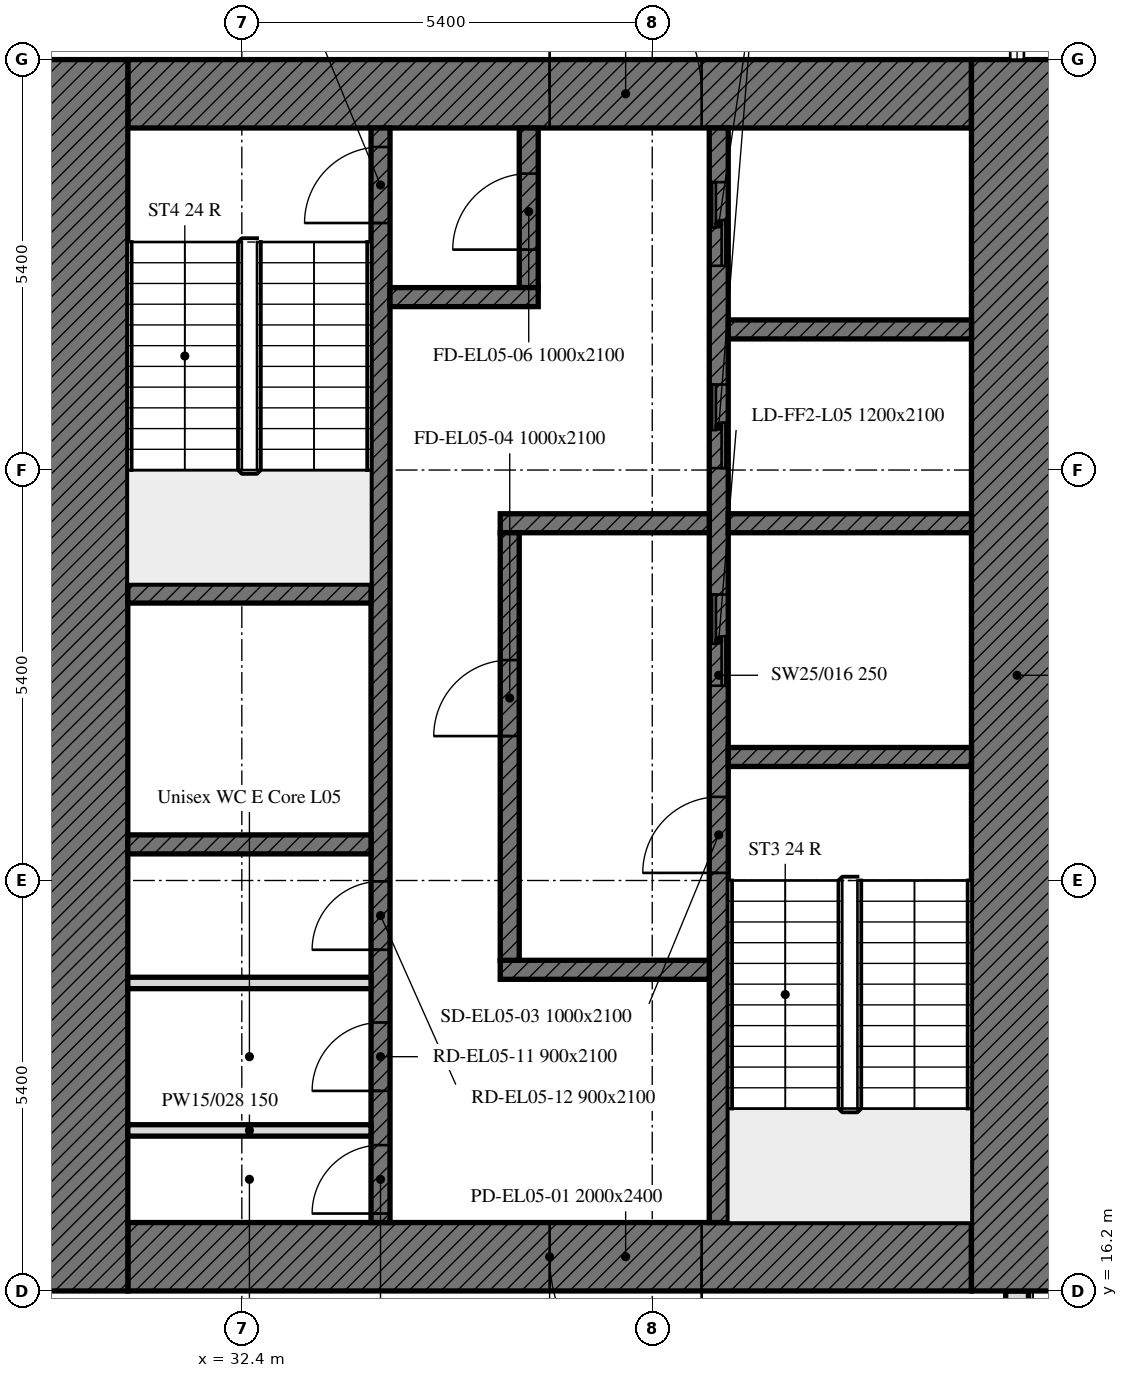
"""IFC4 building model, lengths in metres.
Left out: names, types, materials, properties, quantities, classifications, styles, units other than length and angle.
Written with IfcOpenShell. Run it as: python <this file> out.ifc"""

import sys

from ifc_helpers import new_model, si_unit, direction, frame, frame_2d, origin, place, context, subcontext, project, spatial, rectangle, extrude, element, fill, save


model = new_model("IFC4")
c1 = context("Model", 3, precision=1e-05, world=origin(), true_north=direction((0.0, 1.0)))
c2 = subcontext(c1, "Body", "Model", "MODEL_VIEW")
j1 = project(units=[si_unit("LENGTHUNIT", "METRE"), si_unit("PLANEANGLEUNIT", "RADIAN")], contexts=[c1])
p1 = place(None, origin())
s1 = spatial("IfcSite", under=j1, at=p1, CompositionType="ELEMENT")
p2 = place(p1, origin())
s2 = spatial("IfcBuilding", under=s1, at=p2, CompositionType="ELEMENT")
p3 = place(p2, frame((0.0, 0.0, 29.1)))
s3 = spatial("IfcBuildingStorey", under=s2, at=p3, CompositionType="ELEMENT", Elevation=29.1)
p4 = place(p3, frame((42.6, 5.586, 0.0), z_axis=(0.0, 0.0, 1.0), x_axis=(0.0, 1.0, 0.0)))
e1 = element("IfcWall", 1, at=p4, inside=s3, PredefinedType="SOLIDWALL", context=c2, shape_type="SweptSolid", body=[
    extrude(rectangle(XDim=10.614, YDim=0.3, at=frame_2d((5.307, 0.0))), origin(), (0.0, 0.0, 1.0), 4.2),
])
p5 = place(p4, frame((0.714, 0.0, 0.0)))
e2 = element("IfcOpeningElement", 2, at=p5, cuts=e1, PredefinedType="OPENING", context=c2, shape_type="SweptSolid", body=[
    extrude(rectangle(XDim=1.8, YDim=2.4, at=frame_2d((0.9, 1.2))), frame((0.0, 0.16, 0.0), z_axis=(0.0, -1.0, 0.0), x_axis=(1.0, 0.0, 0.0)), (0.0, 0.0, 1.0), 0.32),
])
p6 = place(p4, frame((6.114, 0.0, 0.0)))
e3 = element("IfcOpeningElement", 3, at=p6, cuts=e1, PredefinedType="OPENING", context=c2, shape_type="SweptSolid", body=[
    extrude(rectangle(XDim=1.8, YDim=2.4, at=frame_2d((0.9, 1.2))), frame((0.0, 0.16, 0.0), z_axis=(0.0, -1.0, 0.0), x_axis=(1.0, 0.0, 0.0)), (0.0, 0.0, 1.0), 0.32),
])
p7 = place(p3, frame((42.0, 16.65, 0.0), z_axis=(0.0, 0.0, 1.0), x_axis=(-1.0, 0.0, 0.0)))
e4 = element("IfcWall", 4, at=p7, inside=s3, PredefinedType="SOLIDWALL", context=c2, shape_type="SweptSolid", body=[
    extrude(rectangle(XDim=11.1, YDim=0.9, at=frame_2d((5.55, 0.0))), origin(), (0.0, 0.0, 1.0), 4.2),
])
p8 = place(p7, frame((3.55, 0.0, 0.0)))
e5 = element("IfcOpeningElement", 5, at=p8, cuts=e4, PredefinedType="OPENING", context=c2, shape_type="SweptSolid", body=[
    extrude(rectangle(XDim=2.0, YDim=2.4, at=frame_2d((1.0, 1.2))), frame((0.0, 0.45, 0.0), z_axis=(0.0, -1.0, 0.0), x_axis=(1.0, 0.0, 0.0)), (0.0, 0.0, 1.0), 0.9),
])
p9 = place(p3, frame((30.9, 31.95, 0.0), z_axis=(0.0, 0.0, 1.0), x_axis=(1.0, 0.0, 0.0)))
e6 = element("IfcWall", 6, at=p9, inside=s3, PredefinedType="SOLIDWALL", context=c2, shape_type="SweptSolid", body=[
    extrude(rectangle(XDim=11.1, YDim=0.9, at=frame_2d((5.55, 0.0))), origin(), (0.0, 0.0, 1.0), 4.2),
])
p10 = place(p9, frame((5.55, 0.0, 0.0)))
e7 = element("IfcOpeningElement", 7, at=p10, cuts=e6, PredefinedType="OPENING", context=c2, shape_type="SweptSolid", body=[
    extrude(rectangle(XDim=2.0, YDim=2.4, at=frame_2d((1.0, 1.2))), frame((0.0, 0.45, 0.0), z_axis=(0.0, -1.0, 0.0), x_axis=(1.0, 0.0, 0.0)), (0.0, 0.0, 1.0), 0.9),
])
for number, where, z_axis, x_axis in (
    (8, (42.6, 32.4, 0.0), (0.0, 0.0, 1.0), (0.0, -1.0, 0.0)),
    (9, (30.3, 16.2, 0.0), (0.0, 0.0, 1.0), (0.0, 1.0, 0.0)),
):
    element("IfcWall", number, at=place(p3, frame(where, z_axis=z_axis, x_axis=x_axis)), inside=s3, PredefinedType="SOLIDWALL", context=c2, shape_type="SweptSolid", body=[
        extrude(rectangle(XDim=16.2, YDim=1.2, at=frame_2d((8.1, 0.0))), origin(), (0.0, 0.0, 1.0), 4.2),
    ])
p11 = place(p3, frame((38.675, 17.1, 0.0), z_axis=(0.0, 0.0, 1.0), x_axis=(0.0, 1.0, 0.0)))
e10 = element("IfcWall", 10, at=p11, inside=s3, PredefinedType="SOLIDWALL", context=c2, shape_type="SweptSolid", body=[
    extrude(rectangle(XDim=14.4, YDim=0.25, at=frame_2d((7.2, 0.0))), origin(), (0.0, 0.0, 1.0), 4.2),
])
p12 = place(p11, frame((4.6, 0.0, 0.0)))
e11 = element("IfcOpeningElement", 11, at=p12, cuts=e10, PredefinedType="OPENING", context=c2, shape_type="SweptSolid", body=[
    extrude(rectangle(XDim=1.0, YDim=2.1, at=frame_2d((0.5, 1.05))), frame((0.0, 0.125, 0.0), z_axis=(0.0, -1.0, 0.0), x_axis=(1.0, 0.0, 0.0)), (0.0, 0.0, 1.0), 0.25),
])
p13 = place(p11, frame((7.062, 0.0, 0.0)))
e12 = element("IfcOpeningElement", 12, at=p13, cuts=e10, PredefinedType="OPENING", context=c2, shape_type="SweptSolid", body=[
    extrude(rectangle(XDim=1.2, YDim=2.1, at=frame_2d((0.6, 1.05))), frame((0.0, 0.125, 0.0), z_axis=(0.0, -1.0, 0.0), x_axis=(1.0, 0.0, 0.0)), (0.0, 0.0, 1.0), 0.25),
])
p14 = place(p11, frame((9.925, 0.0, 0.0)))
e13 = element("IfcOpeningElement", 13, at=p14, cuts=e10, PredefinedType="OPENING", context=c2, shape_type="SweptSolid", body=[
    extrude(rectangle(XDim=1.1, YDim=2.1, at=frame_2d((0.55, 1.05))), frame((0.0, 0.125, 0.0), z_axis=(0.0, -1.0, 0.0), x_axis=(1.0, 0.0, 0.0)), (0.0, 0.0, 1.0), 0.25),
])
p15 = place(p11, frame((12.587, 0.0, 0.0)))
e14 = element("IfcOpeningElement", 14, at=p15, cuts=e10, PredefinedType="OPENING", context=c2, shape_type="SweptSolid", body=[
    extrude(rectangle(XDim=1.1, YDim=2.1, at=frame_2d((0.55, 1.05))), frame((0.0, 0.125, 0.0), z_axis=(0.0, -1.0, 0.0), x_axis=(1.0, 0.0, 0.0)), (0.0, 0.0, 1.0), 0.25),
])
p16 = place(p3, frame((34.225, 17.1, 0.0), z_axis=(0.0, 0.0, 1.0), x_axis=(0.0, 1.0, 0.0)))
e15 = element("IfcWall", 15, at=p16, inside=s3, PredefinedType="SOLIDWALL", context=c2, shape_type="SweptSolid", body=[
    extrude(rectangle(XDim=14.4, YDim=0.25, at=frame_2d((7.2, 0.0))), origin(), (0.0, 0.0, 1.0), 4.2),
])
p17 = place(p16, frame((13.15, 0.0, 0.0)))
e16 = element("IfcOpeningElement", 16, at=p17, cuts=e15, PredefinedType="OPENING", context=c2, shape_type="SweptSolid", body=[
    extrude(rectangle(XDim=1.0, YDim=2.1, at=frame_2d((0.5, 1.05))), frame((0.0, 0.125, 0.0), z_axis=(0.0, -1.0, 0.0), x_axis=(1.0, 0.0, 0.0)), (0.0, 0.0, 1.0), 0.25),
])
p18 = place(p16, frame((0.118, 0.0, 0.0)))
e17 = element("IfcOpeningElement", 17, at=p18, cuts=e15, PredefinedType="OPENING", context=c2, shape_type="SweptSolid", body=[
    extrude(rectangle(XDim=0.9, YDim=2.1, at=frame_2d((0.45, 1.05))), frame((0.0, 0.125, 0.0), z_axis=(0.0, -1.0, 0.0), x_axis=(1.0, 0.0, 0.0)), (0.0, 0.0, 1.0), 0.25),
])
p19 = place(p16, frame((1.732, 0.0, 0.0)))
e18 = element("IfcOpeningElement", 18, at=p19, cuts=e15, PredefinedType="OPENING", context=c2, shape_type="SweptSolid", body=[
    extrude(rectangle(XDim=0.9, YDim=2.1, at=frame_2d((0.45, 1.05))), frame((0.0, 0.125, 0.0), z_axis=(0.0, -1.0, 0.0), x_axis=(1.0, 0.0, 0.0)), (0.0, 0.0, 1.0), 0.25),
])
p20 = place(p16, frame((3.588, 0.0, 0.0)))
e19 = element("IfcOpeningElement", 19, at=p20, cuts=e15, PredefinedType="OPENING", context=c2, shape_type="SweptSolid", body=[
    extrude(rectangle(XDim=0.9, YDim=2.1, at=frame_2d((0.45, 1.05))), frame((0.0, 0.125, 0.0), z_axis=(0.0, -1.0, 0.0), x_axis=(1.0, 0.0, 0.0)), (0.0, 0.0, 1.0), 0.25),
])
p21 = place(p3, frame((38.8, 23.225, 0.0), z_axis=(0.0, 0.0, 1.0), x_axis=(1.0, 0.0, 0.0)))
e20 = element("IfcWall", 20, at=p21, inside=s3, PredefinedType="SOLIDWALL", context=c2, shape_type="SweptSolid", body=[
    extrude(rectangle(XDim=3.2, YDim=0.25, at=frame_2d((1.6, 0.0))), origin(), (0.0, 0.0, 1.0), 4.2),
])
for number, where, z_axis, x_axis in (
    (21, (30.9, 25.375, 0.0), (0.0, 0.0, 1.0), (1.0, 0.0, 0.0)),
    (22, (30.9, 22.075, 0.0), (0.0, 0.0, 1.0), (1.0, 0.0, 0.0)),
):
    element("IfcWall", number, at=place(p3, frame(where, z_axis=z_axis, x_axis=x_axis)), inside=s3, PredefinedType="SOLIDWALL", context=c2, shape_type="SweptSolid", body=[
        extrude(rectangle(XDim=3.2, YDim=0.25, at=frame_2d((1.6, 0.0))), origin(), (0.0, 0.0, 1.0), 4.2),
    ])
p22 = place(p3, frame((38.8, 26.3, 0.0), z_axis=(0.0, 0.0, 1.0), x_axis=(1.0, 0.0, 0.0)))
e23 = element("IfcWall", 23, at=p22, inside=s3, PredefinedType="SOLIDWALL", context=c2, shape_type="SweptSolid", body=[
    extrude(rectangle(XDim=3.2, YDim=0.25, at=frame_2d((1.6, 0.0))), origin(), (0.0, 0.0, 1.0), 4.2),
])
for number, where, z_axis, x_axis in (
    (24, (35.8, 26.3, 0.0), (0.0, 0.0, 1.0), (1.0, 0.0, 0.0)),
    (25, (35.8, 20.425, 0.0), (0.0, 0.0, 1.0), (1.0, 0.0, 0.0)),
):
    element("IfcWall", number, at=place(p3, frame(where, z_axis=z_axis, x_axis=x_axis)), inside=s3, PredefinedType="SOLIDWALL", context=c2, shape_type="SweptSolid", body=[
        extrude(rectangle(XDim=2.75, YDim=0.25, at=frame_2d((1.375, 0.0))), origin(), (0.0, 0.0, 1.0), 4.2),
    ])
p23 = place(p3, frame((36.175, 29.4, 0.0), z_axis=(0.0, 0.0, 1.0), x_axis=(0.0, 1.0, 0.0)))
e26 = element("IfcWall", 26, at=p23, inside=s3, PredefinedType="SOLIDWALL", context=c2, shape_type="SweptSolid", body=[
    extrude(rectangle(XDim=2.1, YDim=0.25, at=frame_2d((1.05, 0.0))), origin(), (0.0, 0.0, 1.0), 4.2),
])
p24 = place(p23, frame((0.5, 0.0, 0.0)))
e27 = element("IfcOpeningElement", 27, at=p24, cuts=e26, PredefinedType="OPENING", context=c2, shape_type="SweptSolid", body=[
    extrude(rectangle(XDim=1.0, YDim=2.1, at=frame_2d((0.5, 1.05))), frame((0.0, 0.125, 0.0), z_axis=(0.0, -1.0, 0.0), x_axis=(1.0, 0.0, 0.0)), (0.0, 0.0, 1.0), 0.25),
])
p25 = place(p3, frame((34.35, 29.275, 0.0), z_axis=(0.0, 0.0, 1.0), x_axis=(1.0, 0.0, 0.0)))
e28 = element("IfcWall", 28, at=p25, inside=s3, PredefinedType="SOLIDWALL", context=c2, shape_type="SweptSolid", body=[
    extrude(rectangle(XDim=1.95, YDim=0.25, at=frame_2d((0.975, 0.0))), origin(), (0.0, 0.0, 1.0), 4.2),
])
p26 = place(p3, frame((35.925, 20.55, 0.0), z_axis=(0.0, 0.0, 1.0), x_axis=(0.0, 1.0, 0.0)))
e29 = element("IfcWall", 29, at=p26, inside=s3, PredefinedType="SOLIDWALL", context=c2, shape_type="SweptSolid", body=[
    extrude(rectangle(XDim=5.625, YDim=0.25, at=frame_2d((2.812, 0.0))), origin(), (0.0, 0.0, 1.0), 4.2),
])
p27 = place(p26, frame((2.95, 0.0, 0.0)))
e30 = element("IfcOpeningElement", 30, at=p27, cuts=e29, PredefinedType="OPENING", context=c2, shape_type="SweptSolid", body=[
    extrude(rectangle(XDim=1.0, YDim=2.1, at=frame_2d((0.5, 1.05))), frame((0.0, 0.125, 0.0), z_axis=(0.0, -1.0, 0.0), x_axis=(1.0, 0.0, 0.0)), (0.0, 0.0, 1.0), 0.25),
])
p28 = place(p3, frame((38.8, 28.85, 0.0), z_axis=(0.0, 0.0, 1.0), x_axis=(1.0, 0.0, 0.0)))
e31 = element("IfcWall", 31, at=p28, inside=s3, PredefinedType="SOLIDWALL", context=c2, shape_type="SweptSolid", body=[
    extrude(rectangle(XDim=3.2, YDim=0.25, at=frame_2d((1.6, 0.0))), origin(), (0.0, 0.0, 1.0), 4.2),
])
for number, where, z_axis, x_axis in (
    (32, (30.9, 18.312, 0.0), (0.0, 0.0, 1.0), (1.0, 0.0, 0.0)),
    (33, (30.9, 20.252, 0.0), (0.0, 0.0, 1.0), (1.0, 0.0, 0.0)),
):
    element("IfcWall", number, at=place(p3, frame(where, z_axis=z_axis, x_axis=x_axis)), inside=s3, PredefinedType="PARTITIONING", context=c2, shape_type="SweptSolid", body=[
        extrude(rectangle(XDim=3.2, YDim=0.15, at=frame_2d((1.6, 0.0))), origin(), (0.0, 0.0, 1.0), 4.2),
    ])
p29 = place(p8, origin())
e34 = element("IfcDoor", 34, at=p29, inside=s3, OperationType="DOUBLE_DOOR_SINGLE_SWING", PredefinedType="DOOR", context=c2, shape_type="SweptSolid", body=[
    extrude(rectangle(XDim=2.0, YDim=2.4, at=frame_2d((1.0, 1.2))), frame((0.0, 0.025, 0.0), z_axis=(0.0, -1.0, 0.0), x_axis=(1.0, 0.0, 0.0)), (0.0, 0.0, 1.0), 0.05),
])
fill(e5, e34)
p30 = place(p10, origin())
e35 = element("IfcDoor", 35, at=p30, inside=s3, OperationType="DOUBLE_DOOR_SINGLE_SWING", PredefinedType="DOOR", context=c2, shape_type="SweptSolid", body=[
    extrude(rectangle(XDim=2.0, YDim=2.4, at=frame_2d((1.0, 1.2))), frame((0.0, 0.025, 0.0), z_axis=(0.0, -1.0, 0.0), x_axis=(1.0, 0.0, 0.0)), (0.0, 0.0, 1.0), 0.05),
])
fill(e7, e35)
p31 = place(p12, origin())
e36 = element("IfcDoor", 36, at=p31, inside=s3, OperationType="SINGLE_SWING_LEFT", PredefinedType="DOOR", context=c2, shape_type="SweptSolid", body=[
    extrude(rectangle(XDim=1.0, YDim=2.1, at=frame_2d((0.5, 1.05))), frame((0.0, 0.025, 0.0), z_axis=(0.0, -1.0, 0.0), x_axis=(1.0, 0.0, 0.0)), (0.0, 0.0, 1.0), 0.05),
])
fill(e11, e36)
p32 = place(p27, origin())
e37 = element("IfcDoor", 37, at=p32, inside=s3, OperationType="SINGLE_SWING_LEFT", PredefinedType="DOOR", context=c2, shape_type="SweptSolid", body=[
    extrude(rectangle(XDim=1.0, YDim=2.1, at=frame_2d((0.5, 1.05))), frame((0.0, 0.025, 0.0), z_axis=(0.0, -1.0, 0.0), x_axis=(1.0, 0.0, 0.0)), (0.0, 0.0, 1.0), 0.05),
])
fill(e30, e37)
p33 = place(p17, origin())
e38 = element("IfcDoor", 38, at=p33, inside=s3, OperationType="SINGLE_SWING_LEFT", PredefinedType="DOOR", context=c2, shape_type="SweptSolid", body=[
    extrude(rectangle(XDim=1.0, YDim=2.1, at=frame_2d((0.5, 1.05))), frame((0.0, 0.025, 0.0), z_axis=(0.0, -1.0, 0.0), x_axis=(1.0, 0.0, 0.0)), (0.0, 0.0, 1.0), 0.05),
])
fill(e16, e38)
p34 = place(p24, origin())
e39 = element("IfcDoor", 39, at=p34, inside=s3, OperationType="SINGLE_SWING_LEFT", PredefinedType="DOOR", context=c2, shape_type="SweptSolid", body=[
    extrude(rectangle(XDim=1.0, YDim=2.1, at=frame_2d((0.5, 1.05))), frame((0.0, 0.025, 0.0), z_axis=(0.0, -1.0, 0.0), x_axis=(1.0, 0.0, 0.0)), (0.0, 0.0, 1.0), 0.05),
])
fill(e27, e39)
p35 = place(p13, origin())
e40 = element("IfcDoor", 40, at=p35, inside=s3, OperationType="DOUBLE_DOOR_SLIDING", PredefinedType="DOOR", context=c2, shape_type="SweptSolid", body=[
    extrude(rectangle(XDim=1.2, YDim=2.1, at=frame_2d((0.6, 1.05))), frame((0.0, 0.025, 0.0), z_axis=(0.0, -1.0, 0.0), x_axis=(1.0, 0.0, 0.0)), (0.0, 0.0, 1.0), 0.05),
])
fill(e12, e40)
p36 = place(p14, origin())
e41 = element("IfcDoor", 41, at=p36, inside=s3, OperationType="DOUBLE_DOOR_SLIDING", PredefinedType="DOOR", context=c2, shape_type="SweptSolid", body=[
    extrude(rectangle(XDim=1.1, YDim=2.1, at=frame_2d((0.55, 1.05))), frame((0.0, 0.025, 0.0), z_axis=(0.0, -1.0, 0.0), x_axis=(1.0, 0.0, 0.0)), (0.0, 0.0, 1.0), 0.05),
])
fill(e13, e41)
p37 = place(p15, origin())
e42 = element("IfcDoor", 42, at=p37, inside=s3, OperationType="DOUBLE_DOOR_SLIDING", PredefinedType="DOOR", context=c2, shape_type="SweptSolid", body=[
    extrude(rectangle(XDim=1.1, YDim=2.1, at=frame_2d((0.55, 1.05))), frame((0.0, 0.025, 0.0), z_axis=(0.0, -1.0, 0.0), x_axis=(1.0, 0.0, 0.0)), (0.0, 0.0, 1.0), 0.05),
])
fill(e14, e42)
p38 = place(p18, origin())
e43 = element("IfcDoor", 43, at=p38, inside=s3, OperationType="SINGLE_SWING_LEFT", PredefinedType="DOOR", context=c2, shape_type="SweptSolid", body=[
    extrude(rectangle(XDim=0.9, YDim=2.1, at=frame_2d((0.45, 1.05))), frame((0.0, 0.025, 0.0), z_axis=(0.0, -1.0, 0.0), x_axis=(1.0, 0.0, 0.0)), (0.0, 0.0, 1.0), 0.05),
])
fill(e17, e43)
p39 = place(p19, origin())
e44 = element("IfcDoor", 44, at=p39, inside=s3, OperationType="SINGLE_SWING_LEFT", PredefinedType="DOOR", context=c2, shape_type="SweptSolid", body=[
    extrude(rectangle(XDim=0.9, YDim=2.1, at=frame_2d((0.45, 1.05))), frame((0.0, 0.025, 0.0), z_axis=(0.0, -1.0, 0.0), x_axis=(1.0, 0.0, 0.0)), (0.0, 0.0, 1.0), 0.05),
])
fill(e18, e44)
p40 = place(p20, origin())
e45 = element("IfcDoor", 45, at=p40, inside=s3, OperationType="SINGLE_SWING_LEFT", PredefinedType="DOOR", context=c2, shape_type="SweptSolid", body=[
    extrude(rectangle(XDim=0.9, YDim=2.1, at=frame_2d((0.45, 1.05))), frame((0.0, 0.025, 0.0), z_axis=(0.0, -1.0, 0.0), x_axis=(1.0, 0.0, 0.0)), (0.0, 0.0, 1.0), 0.05),
])
fill(e19, e45)
save(model, sys.argv[1])
